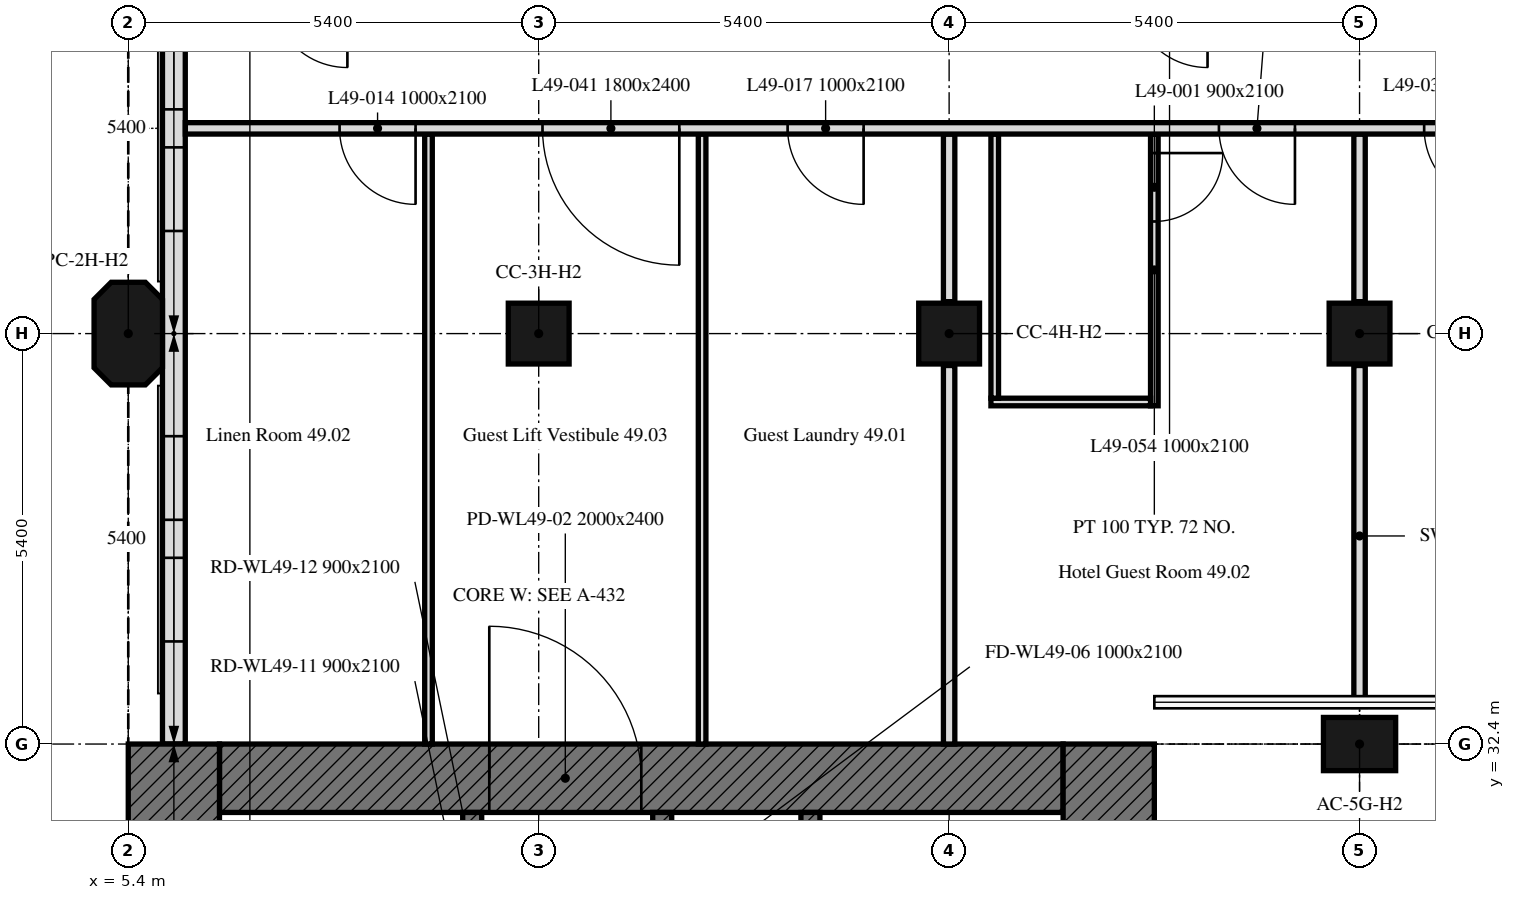
"""IFC4 building model, lengths in metres.
Left out: names, types, materials, properties, quantities, classifications, styles, units other than length and angle.
Written with IfcOpenShell. Run it as: python <this file> out.ifc"""

import sys

from ifc_helpers import new_model, si_unit, direction, frame, frame_2d, origin, origin_2d, place, context, subcontext, project, spatial, polyline, rectangle, outline, extrude, element, fill, save


model = new_model("IFC4")
c1 = context("Model", 3, precision=1e-05, world=origin(), true_north=direction((0.0, 1.0)))
c2 = subcontext(c1, "Body", "Model", "MODEL_VIEW")
j1 = project(units=[si_unit("LENGTHUNIT", "METRE"), si_unit("PLANEANGLEUNIT", "RADIAN")], contexts=[c1])
p1 = place(None, origin())
s1 = spatial("IfcSite", under=j1, at=p1, CompositionType="ELEMENT")
p2 = place(p1, origin())
s2 = spatial("IfcBuilding", under=s1, at=p2, CompositionType="ELEMENT")
p3 = place(p2, frame((0.0, 0.0, 200.5)))
s3 = spatial("IfcBuildingStorey", under=s2, at=p3, CompositionType="ELEMENT", Elevation=200.5)
p4 = place(p3, frame((21.6, 32.4, 0.0), z_axis=(0.0, 0.0, 1.0), x_axis=(1.0, 0.0, 0.0)))
e1 = element("IfcColumn", 1, at=p4, inside=s3, PredefinedType="COLUMN", context=c2, shape_type="SweptSolid", body=[
    extrude(rectangle(XDim=0.95, YDim=0.7, at=origin_2d()), origin(), (0.0, 0.0, 1.0), 3.0),
])
p5 = place(p3, frame((5.4, 37.8, 0.0), z_axis=(0.0, 0.0, 1.0), x_axis=(0.0, 1.0, 0.0)))
e2 = element("IfcColumn", 2, at=p5, inside=s3, PredefinedType="COLUMN", context=c2, shape_type="SweptSolid", body=[
    extrude(outline(polyline([(-0.45, -0.45), (0.45, -0.45), (0.675, -0.225), (0.675, 0.225), (0.45, 0.45), (-0.45, 0.45), (-0.675, 0.225), (-0.675, -0.225), (-0.45, -0.45)])), origin(), (0.0, 0.0, 1.0), 3.0),
])
for number, where, z_axis, x_axis in (
    (3, (10.8, 37.8, 0.0), (0.0, 0.0, 1.0), (1.0, 0.0, 0.0)),
    (4, (16.2, 37.8, 0.0), (0.0, 0.0, 1.0), (1.0, 0.0, 0.0)),
    (5, (21.6, 37.8, 0.0), (0.0, 0.0, 1.0), (1.0, 0.0, 0.0)),
):
    element("IfcColumn", number, at=place(p3, frame(where, z_axis=z_axis, x_axis=x_axis)), inside=s3, PredefinedType="COLUMN", context=c2, shape_type="SweptSolid", body=[
        extrude(rectangle(XDim=0.8, YDim=0.8, at=origin_2d()), origin(), (0.0, 0.0, 1.0), 3.0),
    ])
p6 = place(p3, frame((6.0, 43.014, 0.0), z_axis=(0.0, 0.0, 1.0), x_axis=(0.0, -1.0, 0.0)))
e6 = element("IfcWall", 6, at=p6, inside=s3, PredefinedType="SOLIDWALL", context=c2, shape_type="SweptSolid", body=[
    extrude(rectangle(XDim=10.614, YDim=0.3, at=frame_2d((5.307, 0.0))), origin(), (0.0, 0.0, 1.0), 3.0),
])
p7 = place(p6, frame((1.164, 0.0, 0.9)))
e7 = element("IfcOpeningElement", 7, at=p7, cuts=e6, PredefinedType="OPENING", context=c2, shape_type="SweptSolid", body=[
    extrude(rectangle(XDim=1.1, YDim=1.7, at=frame_2d((0.55, 0.85))), frame((0.0, 0.16, 0.0), z_axis=(0.0, -1.0, 0.0), x_axis=(1.0, 0.0, 0.0)), (0.0, 0.0, 1.0), 0.32),
])
p8 = place(p6, frame((2.764, 0.0, 0.9)))
e8 = element("IfcOpeningElement", 8, at=p8, cuts=e6, PredefinedType="OPENING", context=c2, shape_type="SweptSolid", body=[
    extrude(rectangle(XDim=1.1, YDim=1.7, at=frame_2d((0.55, 0.85))), frame((0.0, 0.16, 0.0), z_axis=(0.0, -1.0, 0.0), x_axis=(1.0, 0.0, 0.0)), (0.0, 0.0, 1.0), 0.32),
])
p9 = place(p6, frame((6.564, 0.0, 0.9)))
e9 = element("IfcOpeningElement", 9, at=p9, cuts=e6, PredefinedType="OPENING", context=c2, shape_type="SweptSolid", body=[
    extrude(rectangle(XDim=1.1, YDim=1.7, at=frame_2d((0.55, 0.85))), frame((0.0, 0.16, 0.0), z_axis=(0.0, -1.0, 0.0), x_axis=(1.0, 0.0, 0.0)), (0.0, 0.0, 1.0), 0.32),
])
p10 = place(p6, frame((8.164, 0.0, 0.9)))
e10 = element("IfcOpeningElement", 10, at=p10, cuts=e6, PredefinedType="OPENING", context=c2, shape_type="SweptSolid", body=[
    extrude(rectangle(XDim=1.1, YDim=1.7, at=frame_2d((0.55, 0.85))), frame((0.0, 0.16, 0.0), z_axis=(0.0, -1.0, 0.0), x_axis=(1.0, 0.0, 0.0)), (0.0, 0.0, 1.0), 0.32),
])
p11 = place(p3, frame((6.6, 31.95, 0.0), z_axis=(0.0, 0.0, 1.0), x_axis=(1.0, 0.0, 0.0)))
e11 = element("IfcWall", 11, at=p11, inside=s3, PredefinedType="SOLIDWALL", context=c2, shape_type="SweptSolid", body=[
    extrude(rectangle(XDim=11.1, YDim=0.9, at=frame_2d((5.55, 0.0))), origin(), (0.0, 0.0, 1.0), 3.0),
])
p12 = place(p11, frame((3.55, 0.0, 0.0)))
e12 = element("IfcOpeningElement", 12, at=p12, cuts=e11, PredefinedType="OPENING", context=c2, shape_type="SweptSolid", body=[
    extrude(rectangle(XDim=2.0, YDim=2.4, at=frame_2d((1.0, 1.2))), frame((0.0, 0.45, 0.0), z_axis=(0.0, -1.0, 0.0), x_axis=(1.0, 0.0, 0.0)), (0.0, 0.0, 1.0), 0.9),
])
for number, where, z_axis, x_axis in (
    (13, (6.0, 16.2, 0.0), (0.0, 0.0, 1.0), (0.0, 1.0, 0.0)),
    (14, (18.3, 32.4, 0.0), (0.0, 0.0, 1.0), (0.0, -1.0, 0.0)),
):
    element("IfcWall", number, at=place(p3, frame(where, z_axis=z_axis, x_axis=x_axis)), inside=s3, PredefinedType="SOLIDWALL", context=c2, shape_type="SweptSolid", body=[
        extrude(rectangle(XDim=16.2, YDim=1.2, at=frame_2d((8.1, 0.0))), origin(), (0.0, 0.0, 1.0), 3.0),
    ])
p13 = place(p3, frame((9.925, 17.1, 0.0), z_axis=(0.0, 0.0, 1.0), x_axis=(0.0, 1.0, 0.0)))
e15 = element("IfcWall", 15, at=p13, inside=s3, PredefinedType="SOLIDWALL", context=c2, shape_type="SweptSolid", body=[
    extrude(rectangle(XDim=14.4, YDim=0.25, at=frame_2d((7.2, 0.0))), origin(), (0.0, 0.0, 1.0), 3.0),
])
p14 = place(p13, frame((4.6, 0.0, 0.0)))
e16 = element("IfcOpeningElement", 16, at=p14, cuts=e15, PredefinedType="OPENING", context=c2, shape_type="SweptSolid", body=[
    extrude(rectangle(XDim=1.0, YDim=2.1, at=frame_2d((0.5, 1.05))), frame((0.0, 0.125, 0.0), z_axis=(0.0, -1.0, 0.0), x_axis=(1.0, 0.0, 0.0)), (0.0, 0.0, 1.0), 0.25),
])
p15 = place(p13, frame((7.062, 0.0, 0.0)))
e17 = element("IfcOpeningElement", 17, at=p15, cuts=e15, PredefinedType="OPENING", context=c2, shape_type="SweptSolid", body=[
    extrude(rectangle(XDim=1.2, YDim=2.1, at=frame_2d((0.6, 1.05))), frame((0.0, 0.125, 0.0), z_axis=(0.0, -1.0, 0.0), x_axis=(1.0, 0.0, 0.0)), (0.0, 0.0, 1.0), 0.25),
])
p16 = place(p13, frame((9.472, 0.0, 0.0)))
e18 = element("IfcOpeningElement", 18, at=p16, cuts=e15, PredefinedType="OPENING", context=c2, shape_type="SweptSolid", body=[
    extrude(rectangle(XDim=0.9, YDim=2.1, at=frame_2d((0.45, 1.05))), frame((0.0, 0.125, 0.0), z_axis=(0.0, -1.0, 0.0), x_axis=(1.0, 0.0, 0.0)), (0.0, 0.0, 1.0), 0.25),
])
p17 = place(p13, frame((10.779, 0.0, 0.0)))
e19 = element("IfcOpeningElement", 19, at=p17, cuts=e15, PredefinedType="OPENING", context=c2, shape_type="SweptSolid", body=[
    extrude(rectangle(XDim=0.9, YDim=2.1, at=frame_2d((0.45, 1.05))), frame((0.0, 0.125, 0.0), z_axis=(0.0, -1.0, 0.0), x_axis=(1.0, 0.0, 0.0)), (0.0, 0.0, 1.0), 0.25),
])
p18 = place(p13, frame((12.048, 0.0, 0.0)))
e20 = element("IfcOpeningElement", 20, at=p18, cuts=e15, PredefinedType="OPENING", context=c2, shape_type="SweptSolid", body=[
    extrude(rectangle(XDim=0.9, YDim=2.1, at=frame_2d((0.45, 1.05))), frame((0.0, 0.125, 0.0), z_axis=(0.0, -1.0, 0.0), x_axis=(1.0, 0.0, 0.0)), (0.0, 0.0, 1.0), 0.25),
])
p19 = place(p13, frame((13.354, 0.0, 0.0)))
e21 = element("IfcOpeningElement", 21, at=p19, cuts=e15, PredefinedType="OPENING", context=c2, shape_type="SweptSolid", body=[
    extrude(rectangle(XDim=0.9, YDim=2.1, at=frame_2d((0.45, 1.05))), frame((0.0, 0.125, 0.0), z_axis=(0.0, -1.0, 0.0), x_axis=(1.0, 0.0, 0.0)), (0.0, 0.0, 1.0), 0.25),
])
p20 = place(p3, frame((14.375, 17.1, 0.0), z_axis=(0.0, 0.0, 1.0), x_axis=(0.0, 1.0, 0.0)))
e22 = element("IfcWall", 22, at=p20, inside=s3, PredefinedType="SOLIDWALL", context=c2, shape_type="SweptSolid", body=[
    extrude(rectangle(XDim=14.4, YDim=0.25, at=frame_2d((7.2, 0.0))), origin(), (0.0, 0.0, 1.0), 3.0),
])
p21 = place(p20, frame((13.15, 0.0, 0.0)))
e23 = element("IfcOpeningElement", 23, at=p21, cuts=e22, PredefinedType="OPENING", context=c2, shape_type="SweptSolid", body=[
    extrude(rectangle(XDim=1.0, YDim=2.1, at=frame_2d((0.5, 1.05))), frame((0.0, 0.125, 0.0), z_axis=(0.0, -1.0, 0.0), x_axis=(1.0, 0.0, 0.0)), (0.0, 0.0, 1.0), 0.25),
])
p22 = place(p20, frame((0.6, 0.0, 0.0)))
e24 = element("IfcOpeningElement", 24, at=p22, cuts=e22, PredefinedType="OPENING", context=c2, shape_type="SweptSolid", body=[
    extrude(rectangle(XDim=1.1, YDim=2.1, at=frame_2d((0.55, 1.05))), frame((0.0, 0.125, 0.0), z_axis=(0.0, -1.0, 0.0), x_axis=(1.0, 0.0, 0.0)), (0.0, 0.0, 1.0), 0.25),
])
p23 = place(p20, frame((3.25, 0.0, 0.0)))
e25 = element("IfcOpeningElement", 25, at=p23, cuts=e22, PredefinedType="OPENING", context=c2, shape_type="SweptSolid", body=[
    extrude(rectangle(XDim=0.9, YDim=2.1, at=frame_2d((0.45, 1.05))), frame((0.0, 0.125, 0.0), z_axis=(0.0, -1.0, 0.0), x_axis=(1.0, 0.0, 0.0)), (0.0, 0.0, 1.0), 0.25),
])
p24 = place(p3, frame((12.425, 29.4, 0.0), z_axis=(0.0, 0.0, 1.0), x_axis=(0.0, 1.0, 0.0)))
e26 = element("IfcWall", 26, at=p24, inside=s3, PredefinedType="SOLIDWALL", context=c2, shape_type="SweptSolid", body=[
    extrude(rectangle(XDim=2.1, YDim=0.25, at=frame_2d((1.05, 0.0))), origin(), (0.0, 0.0, 1.0), 3.0),
])
p25 = place(p24, frame((0.5, 0.0, 0.0)))
e27 = element("IfcOpeningElement", 27, at=p25, cuts=e26, PredefinedType="OPENING", context=c2, shape_type="SweptSolid", body=[
    extrude(rectangle(XDim=1.0, YDim=2.1, at=frame_2d((0.5, 1.05))), frame((0.0, 0.125, 0.0), z_axis=(0.0, -1.0, 0.0), x_axis=(1.0, 0.0, 0.0)), (0.0, 0.0, 1.0), 0.25),
])
p26 = place(p3, frame((21.6, 32.895, 0.0), z_axis=(0.0, 0.0, 1.0), x_axis=(0.0, 1.0, 0.0)))
e28 = element("IfcWall", 28, at=p26, inside=s3, PredefinedType="PARTITIONING", context=c2, shape_type="SweptSolid", body=[
    extrude(rectangle(XDim=4.485, YDim=0.15, at=frame_2d((2.242, 0.0))), origin(), (0.0, 0.0, 1.0), 2.4),
])
p27 = place(p3, frame((21.6, 38.22, 0.0), z_axis=(0.0, 0.0, 1.0), x_axis=(0.0, 1.0, 0.0)))
e29 = element("IfcWall", 29, at=p27, inside=s3, PredefinedType="PARTITIONING", context=c2, shape_type="SweptSolid", body=[
    extrude(rectangle(XDim=2.205, YDim=0.15, at=frame_2d((1.103, 0.0))), origin(), (0.0, 0.0, 1.0), 2.4),
])
p28 = place(p3, frame((18.9, 40.425, 0.0), z_axis=(0.0, 0.0, 1.0), x_axis=(0.0, -1.0, 0.0)))
e30 = element("IfcWall", 30, at=p28, inside=s3, PredefinedType="PARTITIONING", context=c2, shape_type="SweptSolid", body=[
    extrude(rectangle(XDim=3.575, YDim=0.1, at=frame_2d((1.788, 0.0))), origin(), (0.0, 0.0, 1.0), 3.0),
])
p29 = place(p28, frame((0.25, 0.0, 0.0)))
e31 = element("IfcOpeningElement", 31, at=p29, cuts=e30, PredefinedType="OPENING", context=c2, shape_type="SweptSolid", body=[
    extrude(rectangle(XDim=0.9, YDim=2.1, at=frame_2d((0.45, 1.05))), frame((0.0, 0.05, 0.0), z_axis=(0.0, -1.0, 0.0), x_axis=(1.0, 0.0, 0.0)), (0.0, 0.0, 1.0), 0.1),
])
p30 = place(p3, frame((18.85, 36.9, 0.0), z_axis=(0.0, 0.0, 1.0), x_axis=(-1.0, 0.0, 0.0)))
e32 = element("IfcWall", 32, at=p30, inside=s3, PredefinedType="PARTITIONING", context=c2, shape_type="SweptSolid", body=[
    extrude(rectangle(XDim=2.1, YDim=0.1, at=frame_2d((1.05, 0.0))), origin(), (0.0, 0.0, 1.0), 3.0),
])
p31 = place(p3, frame((16.8, 36.95, 0.0), z_axis=(0.0, 0.0, 1.0), x_axis=(0.0, 1.0, 0.0)))
e33 = element("IfcWall", 33, at=p31, inside=s3, PredefinedType="PARTITIONING", context=c2, shape_type="SweptSolid", body=[
    extrude(rectangle(XDim=3.475, YDim=0.1, at=frame_2d((1.738, 0.0))), origin(), (0.0, 0.0, 1.0), 3.0),
])
p32 = place(p3, frame((16.2, 40.425, 0.0), z_axis=(0.0, 0.0, 1.0), x_axis=(0.0, -1.0, 0.0)))
e34 = element("IfcWall", 34, at=p32, inside=s3, PredefinedType="PARTITIONING", context=c2, shape_type="SweptSolid", body=[
    extrude(rectangle(XDim=2.205, YDim=0.15, at=frame_2d((1.103, 0.0))), origin(), (0.0, 0.0, 1.0), 2.4),
])
p33 = place(p3, frame((16.2, 37.38, 0.0), z_axis=(0.0, 0.0, 1.0), x_axis=(0.0, -1.0, 0.0)))
e35 = element("IfcWall", 35, at=p33, inside=s3, PredefinedType="PARTITIONING", context=c2, shape_type="SweptSolid", body=[
    extrude(rectangle(XDim=4.98, YDim=0.15, at=frame_2d((2.49, 0.0))), origin(), (0.0, 0.0, 1.0), 2.4),
])
for number, where, z_axis, x_axis in (
    (36, (9.35, 40.425, 0.0), (0.0, 0.0, 1.0), (0.0, -1.0, 0.0)),
    (37, (12.95, 32.4, 0.0), (0.0, 0.0, 1.0), (0.0, 1.0, 0.0)),
):
    element("IfcWall", number, at=place(p3, frame(where, z_axis=z_axis, x_axis=x_axis)), inside=s3, PredefinedType="PARTITIONING", context=c2, shape_type="SweptSolid", body=[
        extrude(rectangle(XDim=8.025, YDim=0.1, at=frame_2d((4.013, 0.0))), origin(), (0.0, 0.0, 1.0), 3.0),
    ])
p34 = place(p3, frame((32.3, 40.5, 0.0), z_axis=(0.0, 0.0, 1.0), x_axis=(-1.0, 0.0, 0.0)))
e38 = element("IfcWall", 38, at=p34, inside=s3, PredefinedType="PARTITIONING", context=c2, shape_type="SweptSolid", body=[
    extrude(rectangle(XDim=26.149, YDim=0.15, at=frame_2d((13.075, 0.0))), origin(), (0.0, 0.0, 1.0), 2.4),
])
p35 = place(p34, frame((23.12, 0.0, 0.0)))
e39 = element("IfcOpeningElement", 39, at=p35, cuts=e38, PredefinedType="OPENING", context=c2, shape_type="SweptSolid", body=[
    extrude(rectangle(XDim=1.0, YDim=2.1, at=frame_2d((0.5, 1.05))), frame((0.0, 0.075, 0.0), z_axis=(0.0, -1.0, 0.0), x_axis=(1.0, 0.0, 0.0)), (0.0, 0.0, 1.0), 0.15),
])
p36 = place(p34, frame((17.225, 0.0, 0.0)))
e40 = element("IfcOpeningElement", 40, at=p36, cuts=e38, PredefinedType="OPENING", context=c2, shape_type="SweptSolid", body=[
    extrude(rectangle(XDim=1.0, YDim=2.1, at=frame_2d((0.5, 1.05))), frame((0.0, 0.075, 0.0), z_axis=(0.0, -1.0, 0.0), x_axis=(1.0, 0.0, 0.0)), (0.0, 0.0, 1.0), 0.15),
])
p37 = place(p34, frame((11.55, 0.0, 0.0)))
e41 = element("IfcOpeningElement", 41, at=p37, cuts=e38, PredefinedType="OPENING", context=c2, shape_type="SweptSolid", body=[
    extrude(rectangle(XDim=1.0, YDim=2.1, at=frame_2d((0.5, 1.05))), frame((0.0, 0.075, 0.0), z_axis=(0.0, -1.0, 0.0), x_axis=(1.0, 0.0, 0.0)), (0.0, 0.0, 1.0), 0.15),
])
p38 = place(p34, frame((8.85, 0.0, 0.0)))
e42 = element("IfcOpeningElement", 42, at=p38, cuts=e38, PredefinedType="OPENING", context=c2, shape_type="SweptSolid", body=[
    extrude(rectangle(XDim=1.0, YDim=2.1, at=frame_2d((0.5, 1.05))), frame((0.0, 0.075, 0.0), z_axis=(0.0, -1.0, 0.0), x_axis=(1.0, 0.0, 0.0)), (0.0, 0.0, 1.0), 0.15),
])
p39 = place(p34, frame((0.75, 0.0, 0.0)))
e43 = element("IfcOpeningElement", 43, at=p39, cuts=e38, PredefinedType="OPENING", context=c2, shape_type="SweptSolid", body=[
    extrude(rectangle(XDim=1.0, YDim=2.1, at=frame_2d((0.5, 1.05))), frame((0.0, 0.075, 0.0), z_axis=(0.0, -1.0, 0.0), x_axis=(1.0, 0.0, 0.0)), (0.0, 0.0, 1.0), 0.15),
])
p40 = place(p34, frame((19.65, 0.0, 0.0)))
e44 = element("IfcOpeningElement", 44, at=p40, cuts=e38, PredefinedType="OPENING", context=c2, shape_type="SweptSolid", body=[
    extrude(rectangle(XDim=1.8, YDim=2.4, at=frame_2d((0.9, 1.2))), frame((0.0, 0.075, 0.0), z_axis=(0.0, -1.0, 0.0), x_axis=(1.0, 0.0, 0.0)), (0.0, 0.0, 1.0), 0.15),
])
p41 = place(p7, origin())
e45 = element("IfcWindow", 45, at=p41, inside=s3, PartitioningType="SINGLE_PANEL", PredefinedType="WINDOW", context=c2, shape_type="SweptSolid", body=[
    extrude(rectangle(XDim=1.1, YDim=1.7, at=frame_2d((0.55, 0.85))), frame((0.0, 0.03, 0.0), z_axis=(0.0, -1.0, 0.0), x_axis=(1.0, 0.0, 0.0)), (0.0, 0.0, 1.0), 0.06),
])
fill(e7, e45)
p42 = place(p8, origin())
e46 = element("IfcWindow", 46, at=p42, inside=s3, PartitioningType="SINGLE_PANEL", PredefinedType="WINDOW", context=c2, shape_type="SweptSolid", body=[
    extrude(rectangle(XDim=1.1, YDim=1.7, at=frame_2d((0.55, 0.85))), frame((0.0, 0.03, 0.0), z_axis=(0.0, -1.0, 0.0), x_axis=(1.0, 0.0, 0.0)), (0.0, 0.0, 1.0), 0.06),
])
fill(e8, e46)
p43 = place(p9, origin())
e47 = element("IfcWindow", 47, at=p43, inside=s3, PartitioningType="SINGLE_PANEL", PredefinedType="WINDOW", context=c2, shape_type="SweptSolid", body=[
    extrude(rectangle(XDim=1.1, YDim=1.7, at=frame_2d((0.55, 0.85))), frame((0.0, 0.03, 0.0), z_axis=(0.0, -1.0, 0.0), x_axis=(1.0, 0.0, 0.0)), (0.0, 0.0, 1.0), 0.06),
])
fill(e9, e47)
p44 = place(p10, origin())
e48 = element("IfcWindow", 48, at=p44, inside=s3, PartitioningType="SINGLE_PANEL", PredefinedType="WINDOW", context=c2, shape_type="SweptSolid", body=[
    extrude(rectangle(XDim=1.1, YDim=1.7, at=frame_2d((0.55, 0.85))), frame((0.0, 0.03, 0.0), z_axis=(0.0, -1.0, 0.0), x_axis=(1.0, 0.0, 0.0)), (0.0, 0.0, 1.0), 0.06),
])
fill(e10, e48)
p45 = place(p12, origin())
e49 = element("IfcDoor", 49, at=p45, inside=s3, OperationType="DOUBLE_DOOR_SINGLE_SWING", PredefinedType="DOOR", context=c2, shape_type="SweptSolid", body=[
    extrude(rectangle(XDim=2.0, YDim=2.4, at=frame_2d((1.0, 1.2))), frame((0.0, 0.025, 0.0), z_axis=(0.0, -1.0, 0.0), x_axis=(1.0, 0.0, 0.0)), (0.0, 0.0, 1.0), 0.05),
])
fill(e12, e49)
p46 = place(p29, origin())
e50 = element("IfcDoor", 50, at=p46, inside=s3, OperationType="SINGLE_SWING_LEFT", PredefinedType="DOOR", context=c2, shape_type="SweptSolid", body=[
    extrude(rectangle(XDim=0.9, YDim=2.1, at=frame_2d((0.45, 1.05))), frame((0.0, 0.025, 0.0), z_axis=(0.0, -1.0, 0.0), x_axis=(1.0, 0.0, 0.0)), (0.0, 0.0, 1.0), 0.05),
])
fill(e31, e50)
p47 = place(p35, origin())
e51 = element("IfcDoor", 51, at=p47, inside=s3, OperationType="SINGLE_SWING_LEFT", PredefinedType="DOOR", context=c2, shape_type="SweptSolid", body=[
    extrude(rectangle(XDim=1.0, YDim=2.1, at=frame_2d((0.5, 1.05))), frame((0.0, 0.025, 0.0), z_axis=(0.0, -1.0, 0.0), x_axis=(1.0, 0.0, 0.0)), (0.0, 0.0, 1.0), 0.05),
])
fill(e39, e51)
p48 = place(p36, origin())
e52 = element("IfcDoor", 52, at=p48, inside=s3, OperationType="SINGLE_SWING_RIGHT", PredefinedType="DOOR", context=c2, shape_type="SweptSolid", body=[
    extrude(rectangle(XDim=1.0, YDim=2.1, at=frame_2d((0.5, 1.05))), frame((0.0, 0.025, 0.0), z_axis=(0.0, -1.0, 0.0), x_axis=(1.0, 0.0, 0.0)), (0.0, 0.0, 1.0), 0.05),
])
fill(e40, e52)
p49 = place(p37, origin())
e53 = element("IfcDoor", 53, at=p49, inside=s3, OperationType="SINGLE_SWING_LEFT", PredefinedType="DOOR", context=c2, shape_type="SweptSolid", body=[
    extrude(rectangle(XDim=1.0, YDim=2.1, at=frame_2d((0.5, 1.05))), frame((0.0, 0.025, 0.0), z_axis=(0.0, -1.0, 0.0), x_axis=(1.0, 0.0, 0.0)), (0.0, 0.0, 1.0), 0.05),
])
fill(e41, e53)
p50 = place(p38, origin())
e54 = element("IfcDoor", 54, at=p50, inside=s3, OperationType="SINGLE_SWING_RIGHT", PredefinedType="DOOR", context=c2, shape_type="SweptSolid", body=[
    extrude(rectangle(XDim=1.0, YDim=2.1, at=frame_2d((0.5, 1.05))), frame((0.0, 0.025, 0.0), z_axis=(0.0, -1.0, 0.0), x_axis=(1.0, 0.0, 0.0)), (0.0, 0.0, 1.0), 0.05),
])
fill(e42, e54)
p51 = place(p40, origin())
e55 = element("IfcDoor", 55, at=p51, inside=s3, OperationType="DOUBLE_DOOR_SINGLE_SWING", PredefinedType="DOOR", context=c2, shape_type="SweptSolid", body=[
    extrude(rectangle(XDim=1.8, YDim=2.4, at=frame_2d((0.9, 1.2))), frame((0.0, 0.025, 0.0), z_axis=(0.0, -1.0, 0.0), x_axis=(1.0, 0.0, 0.0)), (0.0, 0.0, 1.0), 0.05),
])
fill(e44, e55)
save(model, sys.argv[1])
